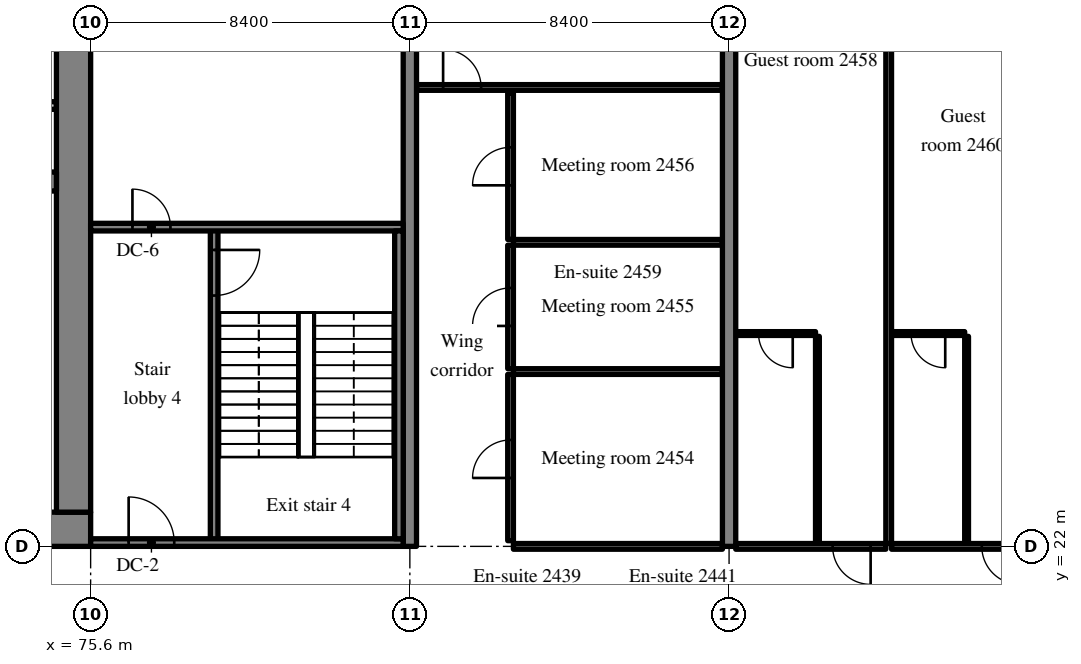
"""IFC4 building model, lengths in metres.
Left out: names, types, materials, properties, quantities, classifications, styles, units other than length and angle.
Written with IfcOpenShell. Run it as: python <this file> out.ifc"""

import sys

from ifc_helpers import new_model, si_unit, direction, frame, frame_2d, origin, place, context, subcontext, project, spatial, rectangle, extrude, source, transform, mapped, element, fill, save


model = new_model("IFC4")
c1 = context("Model", 3, precision=1e-05, world=origin(), true_north=direction((0.0, 1.0)))
c2 = subcontext(c1, "Body", "Model", "MODEL_VIEW")
j1 = project(units=[si_unit("LENGTHUNIT", "METRE"), si_unit("PLANEANGLEUNIT", "RADIAN")], contexts=[c1])
p1 = place(None, origin())
s1 = spatial("IfcSite", under=j1, at=p1, CompositionType="ELEMENT")
p2 = place(p1, origin())
s2 = spatial("IfcBuilding", under=s1, at=p2, CompositionType="ELEMENT")
p3 = place(p2, frame((0.0, 0.0, 102.8)))
s3 = spatial("IfcBuildingStorey", under=s2, at=p3, CompositionType="ELEMENT", Elevation=102.8)
m1 = source(origin(), c2, "Body", "SweptSolid", [
    extrude(rectangle(XDim=50.4, YDim=0.9, at=frame_2d((25.2, 0.0))), origin(), (0.0, 0.0, 1.0), 3.52),
])
p4 = place(p3, frame((25.2, 22.45, 0.0), z_axis=(0.0, 0.0, 1.0), x_axis=(1.0, 0.0, 0.0)))
e1 = element("IfcWall", 1, at=p4, inside=s3, PredefinedType="SHEAR", context=c2, shape_type="MappedRepresentation", body=[
    mapped(m1, transform((0.0, 0.0, 0.0), scale=1.0)),
])
m2 = source(origin(), c2, "Body", "SweptSolid", [
    extrude(rectangle(XDim=1.8, YDim=2.1, at=frame_2d((0.9, 1.05))), frame((0.0, 0.46, 0.0), z_axis=(0.0, -1.0, 0.0), x_axis=(1.0, 0.0, 0.0)), (0.0, 0.0, 1.0), 0.92),
])
p5 = place(p4, frame((15.9, 0.0, 0.0)))
e2 = element("IfcOpeningElement", 2, at=p5, cuts=e1, PredefinedType="OPENING", context=c2, shape_type="MappedRepresentation", body=[
    mapped(m2, transform((0.0, 0.0, 0.0), scale=1.0)),
])
m3 = source(origin(), c2, "Body", "SweptSolid", [
    extrude(rectangle(XDim=1.2, YDim=2.1, at=frame_2d((0.6, 1.05))), frame((0.0, 0.46, 0.0), z_axis=(0.0, -1.0, 0.0), x_axis=(1.0, 0.0, 0.0)), (0.0, 0.0, 1.0), 0.92),
])
p6 = place(p4, frame((26.975, 0.0, 0.0)))
e3 = element("IfcOpeningElement", 3, at=p6, cuts=e1, PredefinedType="OPENING", context=c2, shape_type="MappedRepresentation", body=[
    mapped(m3, transform((0.0, 0.0, 0.0), scale=1.0)),
])
m4 = source(origin(), c2, "Body", "SweptSolid", [
    extrude(rectangle(XDim=0.9, YDim=2.1, at=frame_2d((0.45, 1.05))), frame((0.0, 0.46, 0.0), z_axis=(0.0, -1.0, 0.0), x_axis=(1.0, 0.0, 0.0)), (0.0, 0.0, 1.0), 0.92),
])
p7 = place(p4, frame((32.25, 0.0, 0.0)))
e4 = element("IfcOpeningElement", 4, at=p7, cuts=e1, PredefinedType="OPENING", context=c2, shape_type="MappedRepresentation", body=[
    mapped(m4, transform((0.0, 0.0, 0.0), scale=1.0)),
])
p8 = place(p4, frame((38.275, 0.0, 0.0)))
e5 = element("IfcOpeningElement", 5, at=p8, cuts=e1, PredefinedType="OPENING", context=c2, shape_type="MappedRepresentation", body=[
    mapped(m4, transform((0.0, 0.0, 0.0), scale=1.0)),
])
p9 = place(p4, frame((6.45, 0.0, 0.0)))
e6 = element("IfcOpeningElement", 6, at=p9, cuts=e1, PredefinedType="OPENING", context=c2, shape_type="MappedRepresentation", body=[
    mapped(m3, transform((0.0, 0.0, 0.0), scale=1.0)),
])
p10 = place(p4, frame((47.775, 0.0, 0.0)))
e7 = element("IfcOpeningElement", 7, at=p10, cuts=e1, PredefinedType="OPENING", context=c2, shape_type="MappedRepresentation", body=[
    mapped(m3, transform((0.0, 0.0, 0.0), scale=1.0)),
])
m5 = source(origin(), c2, "Body", "SweptSolid", [
    extrude(rectangle(XDim=18.2, YDim=0.9, at=frame_2d((9.1, 0.0))), origin(), (0.0, 0.0, 1.0), 3.52),
])
p11 = place(p3, frame((75.15, 22.9, 0.0), z_axis=(0.0, 0.0, 1.0), x_axis=(0.0, 1.0, 0.0)))
e8 = element("IfcWall", 8, at=p11, inside=s3, PredefinedType="SHEAR", context=c2, shape_type="MappedRepresentation", body=[
    mapped(m5, transform((0.0, 0.0, 0.0), scale=1.0)),
])
p12 = place(p11, frame((12.5, 0.0, 0.0)))
e9 = element("IfcOpeningElement", 9, at=p12, cuts=e8, PredefinedType="OPENING", context=c2, shape_type="MappedRepresentation", body=[
    mapped(m3, transform((0.0, 0.0, 0.0), scale=1.0)),
])
m6 = source(origin(), c2, "Body", "SweptSolid", [
    extrude(rectangle(XDim=7.25, YDim=0.5, at=frame_2d((3.625, 0.0))), origin(), (0.0, 0.0, 1.0), 3.52),
])
p13 = place(p3, frame((67.45, 31.6, 0.0), z_axis=(0.0, 0.0, 1.0), x_axis=(1.0, 0.0, 0.0)))
e10 = element("IfcWall", 10, at=p13, inside=s3, PredefinedType="SHEAR", context=c2, shape_type="MappedRepresentation", body=[
    mapped(m6, transform((0.0, 0.0, 0.0), scale=1.0)),
])
m7 = source(origin(), c2, "Body", "SweptSolid", [
    extrude(rectangle(XDim=1.1, YDim=2.1, at=frame_2d((0.55, 1.05))), frame((0.0, 0.26, 0.0), z_axis=(0.0, -1.0, 0.0), x_axis=(1.0, 0.0, 0.0)), (0.0, 0.0, 1.0), 0.52),
])
p14 = place(p13, frame((5.575, 0.0, 0.0)))
e11 = element("IfcOpeningElement", 11, at=p14, cuts=e10, PredefinedType="OPENING", context=c2, shape_type="MappedRepresentation", body=[
    mapped(m7, transform((0.0, 0.0, 0.0), scale=1.0)),
])
m8 = source(origin(), c2, "Body", "SweptSolid", [
    extrude(rectangle(XDim=20.0, YDim=0.35, at=frame_2d((10.0, 0.0))), origin(), (0.0, 0.0, 1.0), 3.52),
])
for number, where, z_axis, x_axis in (
    (12, (84.0, 22.0, 0.0), (0.0, 0.0, 1.0), (0.0, 1.0, 0.0)),
    (13, (92.4, 22.0, 0.0), (0.0, 0.0, 1.0), (0.0, 1.0, 0.0)),
):
    element("IfcWall", number, at=place(p3, frame(where, z_axis=z_axis, x_axis=x_axis)), inside=s3, PredefinedType="SHEAR", context=c2, shape_type="MappedRepresentation", body=[
        mapped(m8, transform((0.0, 0.0, 0.0), scale=1.0)),
    ])
m9 = source(origin(), c2, "Body", "SweptSolid", [
    extrude(rectangle(XDim=2.25, YDim=0.2, at=frame_2d((1.125, 0.0))), origin(), (0.0, 0.0, 1.0), 3.52),
])
p15 = place(p3, frame((72.45, 33.6, 0.0), z_axis=(0.0, 0.0, 1.0), x_axis=(1.0, 0.0, 0.0)))
e14 = element("IfcWall", 14, at=p15, inside=s3, PredefinedType="SOLIDWALL", context=c2, shape_type="MappedRepresentation", body=[
    mapped(m9, transform((0.0, 0.0, 0.0), scale=1.0)),
])
m10 = source(origin(), c2, "Body", "SweptSolid", [
    extrude(rectangle(XDim=8.3, YDim=0.2, at=frame_2d((4.15, 0.0))), origin(), (0.0, 0.0, 1.0), 3.52),
])
p16 = place(p3, frame((78.85, 22.1, 0.0), z_axis=(0.0, 0.0, 1.0), x_axis=(0.0, 1.0, 0.0)))
e15 = element("IfcWall", 15, at=p16, inside=s3, PredefinedType="SOLIDWALL", context=c2, shape_type="MappedRepresentation", body=[
    mapped(m10, transform((0.0, 0.0, 0.0), scale=1.0)),
])
m11 = source(origin(), c2, "Body", "SweptSolid", [
    extrude(rectangle(XDim=1.2, YDim=2.1, at=frame_2d((0.6, 1.05))), frame((0.0, 0.11, 0.0), z_axis=(0.0, -1.0, 0.0), x_axis=(1.0, 0.0, 0.0)), (0.0, 0.0, 1.0), 0.22),
])
p17 = place(p16, frame((6.5, 0.0, 0.0)))
e16 = element("IfcOpeningElement", 16, at=p17, cuts=e15, PredefinedType="OPENING", context=c2, shape_type="MappedRepresentation", body=[
    mapped(m11, transform((0.0, 0.0, 0.0), scale=1.0)),
])
m12 = source(origin(), c2, "Body", "SweptSolid", [
    extrude(rectangle(XDim=8.225, YDim=0.2, at=frame_2d((4.112, 0.0))), origin(), (0.0, 0.0, 1.0), 3.52),
])
p18 = place(p3, frame((83.825, 22.1, 0.0), z_axis=(0.0, 0.0, 1.0), x_axis=(-1.0, 0.0, 0.0)))
e17 = element("IfcWall", 17, at=p18, inside=s3, PredefinedType="SOLIDWALL", context=c2, shape_type="MappedRepresentation", body=[
    mapped(m12, transform((0.0, 0.0, 0.0), scale=1.0)),
])
p19 = place(p18, frame((6.025, 0.0, 0.0)))
e18 = element("IfcOpeningElement", 18, at=p19, cuts=e17, PredefinedType="OPENING", context=c2, shape_type="MappedRepresentation", body=[
    mapped(m11, transform((0.0, 0.0, 0.0), scale=1.0)),
])
p20 = place(p3, frame((83.825, 30.4, 0.0), z_axis=(0.0, 0.0, 1.0), x_axis=(-1.0, 0.0, 0.0)))
e19 = element("IfcWall", 19, at=p20, inside=s3, PredefinedType="SOLIDWALL", context=c2, shape_type="MappedRepresentation", body=[
    mapped(m12, transform((0.0, 0.0, 0.0), scale=1.0)),
])
m13 = source(origin(), c2, "Body", "SweptSolid", [
    extrude(rectangle(XDim=1.0, YDim=2.1, at=frame_2d((0.5, 1.05))), frame((0.0, 0.11, 0.0), z_axis=(0.0, -1.0, 0.0), x_axis=(1.0, 0.0, 0.0)), (0.0, 0.0, 1.0), 0.22),
])
p21 = place(p20, frame((6.125, 0.0, 0.0)))
e20 = element("IfcOpeningElement", 20, at=p21, cuts=e19, PredefinedType="OPENING", context=c2, shape_type="MappedRepresentation", body=[
    mapped(m13, transform((0.0, 0.0, 0.0), scale=1.0)),
])
m14 = source(origin(), c2, "Body", "SweptSolid", [
    extrude(rectangle(XDim=8.1, YDim=0.225, at=frame_2d((4.05, 0.0))), origin(), (0.0, 0.0, 1.0), 3.52),
])
p22 = place(p3, frame((83.713, 22.2, 0.0), z_axis=(0.0, 0.0, 1.0), x_axis=(0.0, 1.0, 0.0)))
e21 = element("IfcWall", 21, at=p22, inside=s3, PredefinedType="SOLIDWALL", context=c2, shape_type="MappedRepresentation", body=[
    mapped(m14, transform((0.0, 0.0, 0.0), scale=1.0)),
])
m15 = source(origin(), c2, "Body", "SweptSolid", [
    extrude(rectangle(XDim=5.5, YDim=0.15, at=frame_2d((2.75, 0.0))), origin(), (0.0, 0.0, 1.0), 2.82),
])
p23 = place(p3, frame((86.725, 22.0, 0.0), z_axis=(0.0, 0.0, 1.0), x_axis=(1.0, 0.0, 0.0)))
e22 = element("IfcWall", 22, at=p23, inside=s3, PredefinedType="PARTITIONING", context=c2, shape_type="MappedRepresentation", body=[
    mapped(m15, transform((0.0, 0.0, 0.0), scale=1.0)),
])
m16 = source(origin(), c2, "Body", "SweptSolid", [
    extrude(rectangle(XDim=4.375, YDim=0.15, at=frame_2d((2.188, 0.0))), origin(), (0.0, 0.0, 1.0), 3.52),
])
p24 = place(p3, frame((86.65, 22.15, 0.0), z_axis=(0.0, 0.0, 1.0), x_axis=(0.0, 1.0, 0.0)))
e23 = element("IfcWall", 23, at=p24, inside=s3, PredefinedType="PARTITIONING", context=c2, shape_type="MappedRepresentation", body=[
    mapped(m16, transform((0.0, 0.0, 0.0), scale=1.0)),
])
m17 = source(origin(), c2, "Body", "SweptSolid", [
    extrude(rectangle(XDim=1.0, YDim=2.1, at=frame_2d((0.5, 1.05))), frame((0.0, 0.085, 0.0), z_axis=(0.0, -1.0, 0.0), x_axis=(1.0, 0.0, 0.0)), (0.0, 0.0, 1.0), 0.17),
])
p25 = place(p24, frame((1.65, 0.0, 0.0)))
e24 = element("IfcOpeningElement", 24, at=p25, cuts=e23, PredefinedType="OPENING", context=c2, shape_type="MappedRepresentation", body=[
    mapped(m17, transform((0.0, 0.0, 0.0), scale=1.0)),
])
m18 = source(origin(), c2, "Body", "SweptSolid", [
    extrude(rectangle(XDim=5.5, YDim=0.15, at=frame_2d((2.75, 0.0))), origin(), (0.0, 0.0, 1.0), 3.52),
])
p26 = place(p3, frame((86.725, 26.6, 0.0), z_axis=(0.0, 0.0, 1.0), x_axis=(1.0, 0.0, 0.0)))
e25 = element("IfcWall", 25, at=p26, inside=s3, PredefinedType="PARTITIONING", context=c2, shape_type="MappedRepresentation", body=[
    mapped(m18, transform((0.0, 0.0, 0.0), scale=1.0)),
])
m19 = source(origin(), c2, "Body", "SweptSolid", [
    extrude(rectangle(XDim=3.25, YDim=0.15, at=frame_2d((1.625, 0.0))), origin(), (0.0, 0.0, 1.0), 3.52),
])
p27 = place(p3, frame((86.65, 26.675, 0.0), z_axis=(0.0, 0.0, 1.0), x_axis=(0.0, 1.0, 0.0)))
e26 = element("IfcWall", 26, at=p27, inside=s3, PredefinedType="PARTITIONING", context=c2, shape_type="MappedRepresentation", body=[
    mapped(m19, transform((0.0, 0.0, 0.0), scale=1.0)),
])
p28 = place(p27, frame((1.125, 0.0, 0.0)))
e27 = element("IfcOpeningElement", 27, at=p28, cuts=e26, PredefinedType="OPENING", context=c2, shape_type="MappedRepresentation", body=[
    mapped(m17, transform((0.0, 0.0, 0.0), scale=1.0)),
])
p29 = place(p3, frame((86.725, 30.0, 0.0), z_axis=(0.0, 0.0, 1.0), x_axis=(1.0, 0.0, 0.0)))
e28 = element("IfcWall", 28, at=p29, inside=s3, PredefinedType="PARTITIONING", context=c2, shape_type="MappedRepresentation", body=[
    mapped(m18, transform((0.0, 0.0, 0.0), scale=1.0)),
])
m20 = source(origin(), c2, "Body", "SweptSolid", [
    extrude(rectangle(XDim=3.85, YDim=0.15, at=frame_2d((1.925, 0.0))), origin(), (0.0, 0.0, 1.0), 3.52),
])
p30 = place(p3, frame((86.65, 30.075, 0.0), z_axis=(0.0, 0.0, 1.0), x_axis=(0.0, 1.0, 0.0)))
e29 = element("IfcWall", 29, at=p30, inside=s3, PredefinedType="PARTITIONING", context=c2, shape_type="MappedRepresentation", body=[
    mapped(m20, transform((0.0, 0.0, 0.0), scale=1.0)),
])
p31 = place(p30, frame((1.425, 0.0, 0.0)))
e30 = element("IfcOpeningElement", 30, at=p31, cuts=e29, PredefinedType="OPENING", context=c2, shape_type="MappedRepresentation", body=[
    mapped(m17, transform((0.0, 0.0, 0.0), scale=1.0)),
])
m21 = source(origin(), c2, "Body", "SweptSolid", [
    extrude(rectangle(XDim=8.05, YDim=0.15, at=frame_2d((4.025, 0.0))), origin(), (0.0, 0.0, 1.0), 3.52),
])
p32 = place(p3, frame((84.175, 34.075, 0.0), z_axis=(0.0, 0.0, 1.0), x_axis=(1.0, 0.0, 0.0)))
e31 = element("IfcWall", 31, at=p32, inside=s3, PredefinedType="PARTITIONING", context=c2, shape_type="MappedRepresentation", body=[
    mapped(m21, transform((0.0, 0.0, 0.0), scale=1.0)),
])
p33 = place(p32, frame((0.7, 0.0, 0.0)))
e32 = element("IfcOpeningElement", 32, at=p33, cuts=e31, PredefinedType="OPENING", context=c2, shape_type="MappedRepresentation", body=[
    mapped(m17, transform((0.0, 0.0, 0.0), scale=1.0)),
])
m22 = source(origin(), c2, "Body", "SweptSolid", [
    extrude(rectangle(XDim=5.45, YDim=0.1, at=frame_2d((2.725, 0.0))), origin(), (0.0, 0.0, 1.0), 3.52),
])
p34 = place(p3, frame((94.725, 22.075, 0.0), z_axis=(0.0, 0.0, 1.0), x_axis=(0.0, 1.0, 0.0)))
e33 = element("IfcWall", 33, at=p34, inside=s3, PredefinedType="PARTITIONING", context=c2, shape_type="MappedRepresentation", body=[
    mapped(m22, transform((0.0, 0.0, 0.0), scale=1.0)),
])
m23 = source(origin(), c2, "Body", "SweptSolid", [
    extrude(rectangle(XDim=2.1, YDim=0.1, at=frame_2d((1.05, 0.0))), origin(), (0.0, 0.0, 1.0), 3.52),
])
p35 = place(p3, frame((92.575, 27.6, 0.0), z_axis=(0.0, 0.0, 1.0), x_axis=(1.0, 0.0, 0.0)))
e34 = element("IfcWall", 34, at=p35, inside=s3, PredefinedType="PARTITIONING", context=c2, shape_type="MappedRepresentation", body=[
    mapped(m23, transform((0.0, 0.0, 0.0), scale=1.0)),
])
m24 = source(origin(), c2, "Body", "SweptSolid", [
    extrude(rectangle(XDim=0.9, YDim=2.1, at=frame_2d((0.45, 1.05))), frame((0.0, 0.06, 0.0), z_axis=(0.0, -1.0, 0.0), x_axis=(1.0, 0.0, 0.0)), (0.0, 0.0, 1.0), 0.12),
])
p36 = place(p35, frame((0.6, 0.0, 0.0)))
e35 = element("IfcOpeningElement", 35, at=p36, cuts=e34, PredefinedType="OPENING", context=c2, shape_type="MappedRepresentation", body=[
    mapped(m24, transform((0.0, 0.0, 0.0), scale=1.0)),
])
m25 = source(origin(), c2, "Body", "SweptSolid", [
    extrude(rectangle(XDim=3.95, YDim=0.15, at=frame_2d((1.975, 0.0))), origin(), (0.0, 0.0, 1.0), 2.82),
])
p37 = place(p3, frame((92.575, 22.0, 0.0), z_axis=(0.0, 0.0, 1.0), x_axis=(1.0, 0.0, 0.0)))
e36 = element("IfcWall", 36, at=p37, inside=s3, PredefinedType="PARTITIONING", context=c2, shape_type="MappedRepresentation", body=[
    mapped(m25, transform((0.0, 0.0, 0.0), scale=1.0)),
])
p38 = place(p37, frame((2.55, 0.0, 0.0)))
e37 = element("IfcOpeningElement", 37, at=p38, cuts=e36, PredefinedType="OPENING", context=c2, shape_type="MappedRepresentation", body=[
    mapped(m17, transform((0.0, 0.0, 0.0), scale=1.0)),
])
p39 = place(p3, frame((98.65, 22.075, 0.0), z_axis=(0.0, 0.0, 1.0), x_axis=(0.0, 1.0, 0.0)))
e38 = element("IfcWall", 38, at=p39, inside=s3, PredefinedType="PARTITIONING", context=c2, shape_type="MappedRepresentation", body=[
    mapped(m22, transform((0.0, 0.0, 0.0), scale=1.0)),
])
m26 = source(origin(), c2, "Body", "SweptSolid", [
    extrude(rectangle(XDim=1.925, YDim=0.1, at=frame_2d((0.962, 0.0))), origin(), (0.0, 0.0, 1.0), 3.52),
])
p40 = place(p3, frame((96.675, 27.6, 0.0), z_axis=(0.0, 0.0, 1.0), x_axis=(1.0, 0.0, 0.0)))
e39 = element("IfcWall", 39, at=p40, inside=s3, PredefinedType="PARTITIONING", context=c2, shape_type="MappedRepresentation", body=[
    mapped(m26, transform((0.0, 0.0, 0.0), scale=1.0)),
])
p41 = place(p40, frame((0.513, 0.0, 0.0)))
e40 = element("IfcOpeningElement", 40, at=p41, cuts=e39, PredefinedType="OPENING", context=c2, shape_type="MappedRepresentation", body=[
    mapped(m24, transform((0.0, 0.0, 0.0), scale=1.0)),
])
m27 = source(origin(), c2, "Body", "SweptSolid", [
    extrude(rectangle(XDim=3.775, YDim=0.15, at=frame_2d((1.887, 0.0))), origin(), (0.0, 0.0, 1.0), 2.82),
])
p42 = place(p3, frame((96.675, 22.0, 0.0), z_axis=(0.0, 0.0, 1.0), x_axis=(1.0, 0.0, 0.0)))
e41 = element("IfcWall", 41, at=p42, inside=s3, PredefinedType="PARTITIONING", context=c2, shape_type="MappedRepresentation", body=[
    mapped(m27, transform((0.0, 0.0, 0.0), scale=1.0)),
])
p43 = place(p42, frame((2.375, 0.0, 0.0)))
e42 = element("IfcOpeningElement", 42, at=p43, cuts=e41, PredefinedType="OPENING", context=c2, shape_type="MappedRepresentation", body=[
    mapped(m17, transform((0.0, 0.0, 0.0), scale=1.0)),
])
m28 = source(origin(), c2, "Body", "SweptSolid", [
    extrude(rectangle(XDim=19.347, YDim=0.15, at=frame_2d((9.674, 0.0))), origin(), (0.0, 0.0, 1.0), 3.52),
])
p44 = place(p3, frame((96.6, 22.075, 0.0), z_axis=(0.0, 0.0, 1.0), x_axis=(0.0, 1.0, 0.0)))
e43 = element("IfcWall", 43, at=p44, inside=s3, PredefinedType="PARTITIONING", context=c2, shape_type="MappedRepresentation", body=[
    mapped(m28, transform((0.0, 0.0, 0.0), scale=1.0)),
])
m29 = source(origin(), c2, "Body", "SweptSolid", [
    extrude(rectangle(XDim=1.2, YDim=2.1, at=frame_2d((0.6, 1.05))), frame((0.0, 0.025, 0.0), z_axis=(0.0, -1.0, 0.0), x_axis=(1.0, 0.0, 0.0)), (0.0, 0.0, 1.0), 0.05),
])
p45 = place(p17, origin())
e44 = element("IfcDoor", 44, at=p45, inside=s3, OperationType="SINGLE_SWING_RIGHT", PredefinedType="DOOR", context=c2, shape_type="MappedRepresentation", body=[
    mapped(m29, transform((0.0, 0.0, 0.0), scale=1.0)),
])
fill(e16, e44)
p46 = place(p19, origin())
e45 = element("IfcDoor", 45, at=p46, inside=s3, OperationType="SINGLE_SWING_RIGHT", PredefinedType="DOOR", context=c2, shape_type="MappedRepresentation", body=[
    mapped(m29, transform((0.0, 0.0, 0.0), scale=1.0)),
])
fill(e18, e45)
m30 = source(origin(), c2, "Body", "SweptSolid", [
    extrude(rectangle(XDim=1.0, YDim=2.1, at=frame_2d((0.5, 1.05))), frame((0.0, 0.025, 0.0), z_axis=(0.0, -1.0, 0.0), x_axis=(1.0, 0.0, 0.0)), (0.0, 0.0, 1.0), 0.05),
])
p47 = place(p21, origin())
e46 = element("IfcDoor", 46, at=p47, inside=s3, OperationType="SINGLE_SWING_RIGHT", PredefinedType="DOOR", context=c2, shape_type="MappedRepresentation", body=[
    mapped(m30, transform((0.0, 0.0, 0.0), scale=1.0)),
])
fill(e20, e46)
p48 = place(p25, origin())
e47 = element("IfcDoor", 47, at=p48, inside=s3, OperationType="SINGLE_SWING_LEFT", PredefinedType="DOOR", context=c2, shape_type="MappedRepresentation", body=[
    mapped(m30, transform((0.0, 0.0, 0.0), scale=1.0)),
])
fill(e24, e47)
p49 = place(p28, origin())
e48 = element("IfcDoor", 48, at=p49, inside=s3, OperationType="SINGLE_SWING_LEFT", PredefinedType="DOOR", context=c2, shape_type="MappedRepresentation", body=[
    mapped(m30, transform((0.0, 0.0, 0.0), scale=1.0)),
])
fill(e27, e48)
p50 = place(p31, origin())
e49 = element("IfcDoor", 49, at=p50, inside=s3, OperationType="SINGLE_SWING_LEFT", PredefinedType="DOOR", context=c2, shape_type="MappedRepresentation", body=[
    mapped(m30, transform((0.0, 0.0, 0.0), scale=1.0)),
])
fill(e30, e49)
p51 = place(p33, origin())
e50 = element("IfcDoor", 50, at=p51, inside=s3, OperationType="SINGLE_SWING_LEFT", PredefinedType="DOOR", context=c2, shape_type="MappedRepresentation", body=[
    mapped(m30, transform((0.0, 0.0, 0.0), scale=1.0)),
])
fill(e32, e50)
m31 = source(origin(), c2, "Body", "SweptSolid", [
    extrude(rectangle(XDim=0.9, YDim=2.1, at=frame_2d((0.45, 1.05))), frame((0.0, 0.025, 0.0), z_axis=(0.0, -1.0, 0.0), x_axis=(1.0, 0.0, 0.0)), (0.0, 0.0, 1.0), 0.05),
])
p52 = place(p36, origin())
e51 = element("IfcDoor", 51, at=p52, inside=s3, OperationType="SINGLE_SWING_RIGHT", PredefinedType="DOOR", context=c2, shape_type="MappedRepresentation", body=[
    mapped(m31, transform((0.0, 0.0, 0.0), scale=1.0)),
])
fill(e35, e51)
p53 = place(p38, origin())
e52 = element("IfcDoor", 52, at=p53, inside=s3, OperationType="SINGLE_SWING_RIGHT", PredefinedType="DOOR", context=c2, shape_type="MappedRepresentation", body=[
    mapped(m30, transform((0.0, 0.0, 0.0), scale=1.0)),
])
fill(e37, e52)
p54 = place(p41, origin())
e53 = element("IfcDoor", 53, at=p54, inside=s3, OperationType="SINGLE_SWING_RIGHT", PredefinedType="DOOR", context=c2, shape_type="MappedRepresentation", body=[
    mapped(m31, transform((0.0, 0.0, 0.0), scale=1.0)),
])
fill(e40, e53)
p55 = place(p43, origin())
e54 = element("IfcDoor", 54, at=p55, inside=s3, OperationType="SINGLE_SWING_RIGHT", PredefinedType="DOOR", context=c2, shape_type="MappedRepresentation", body=[
    mapped(m30, transform((0.0, 0.0, 0.0), scale=1.0)),
])
fill(e42, e54)
save(model, sys.argv[1])
